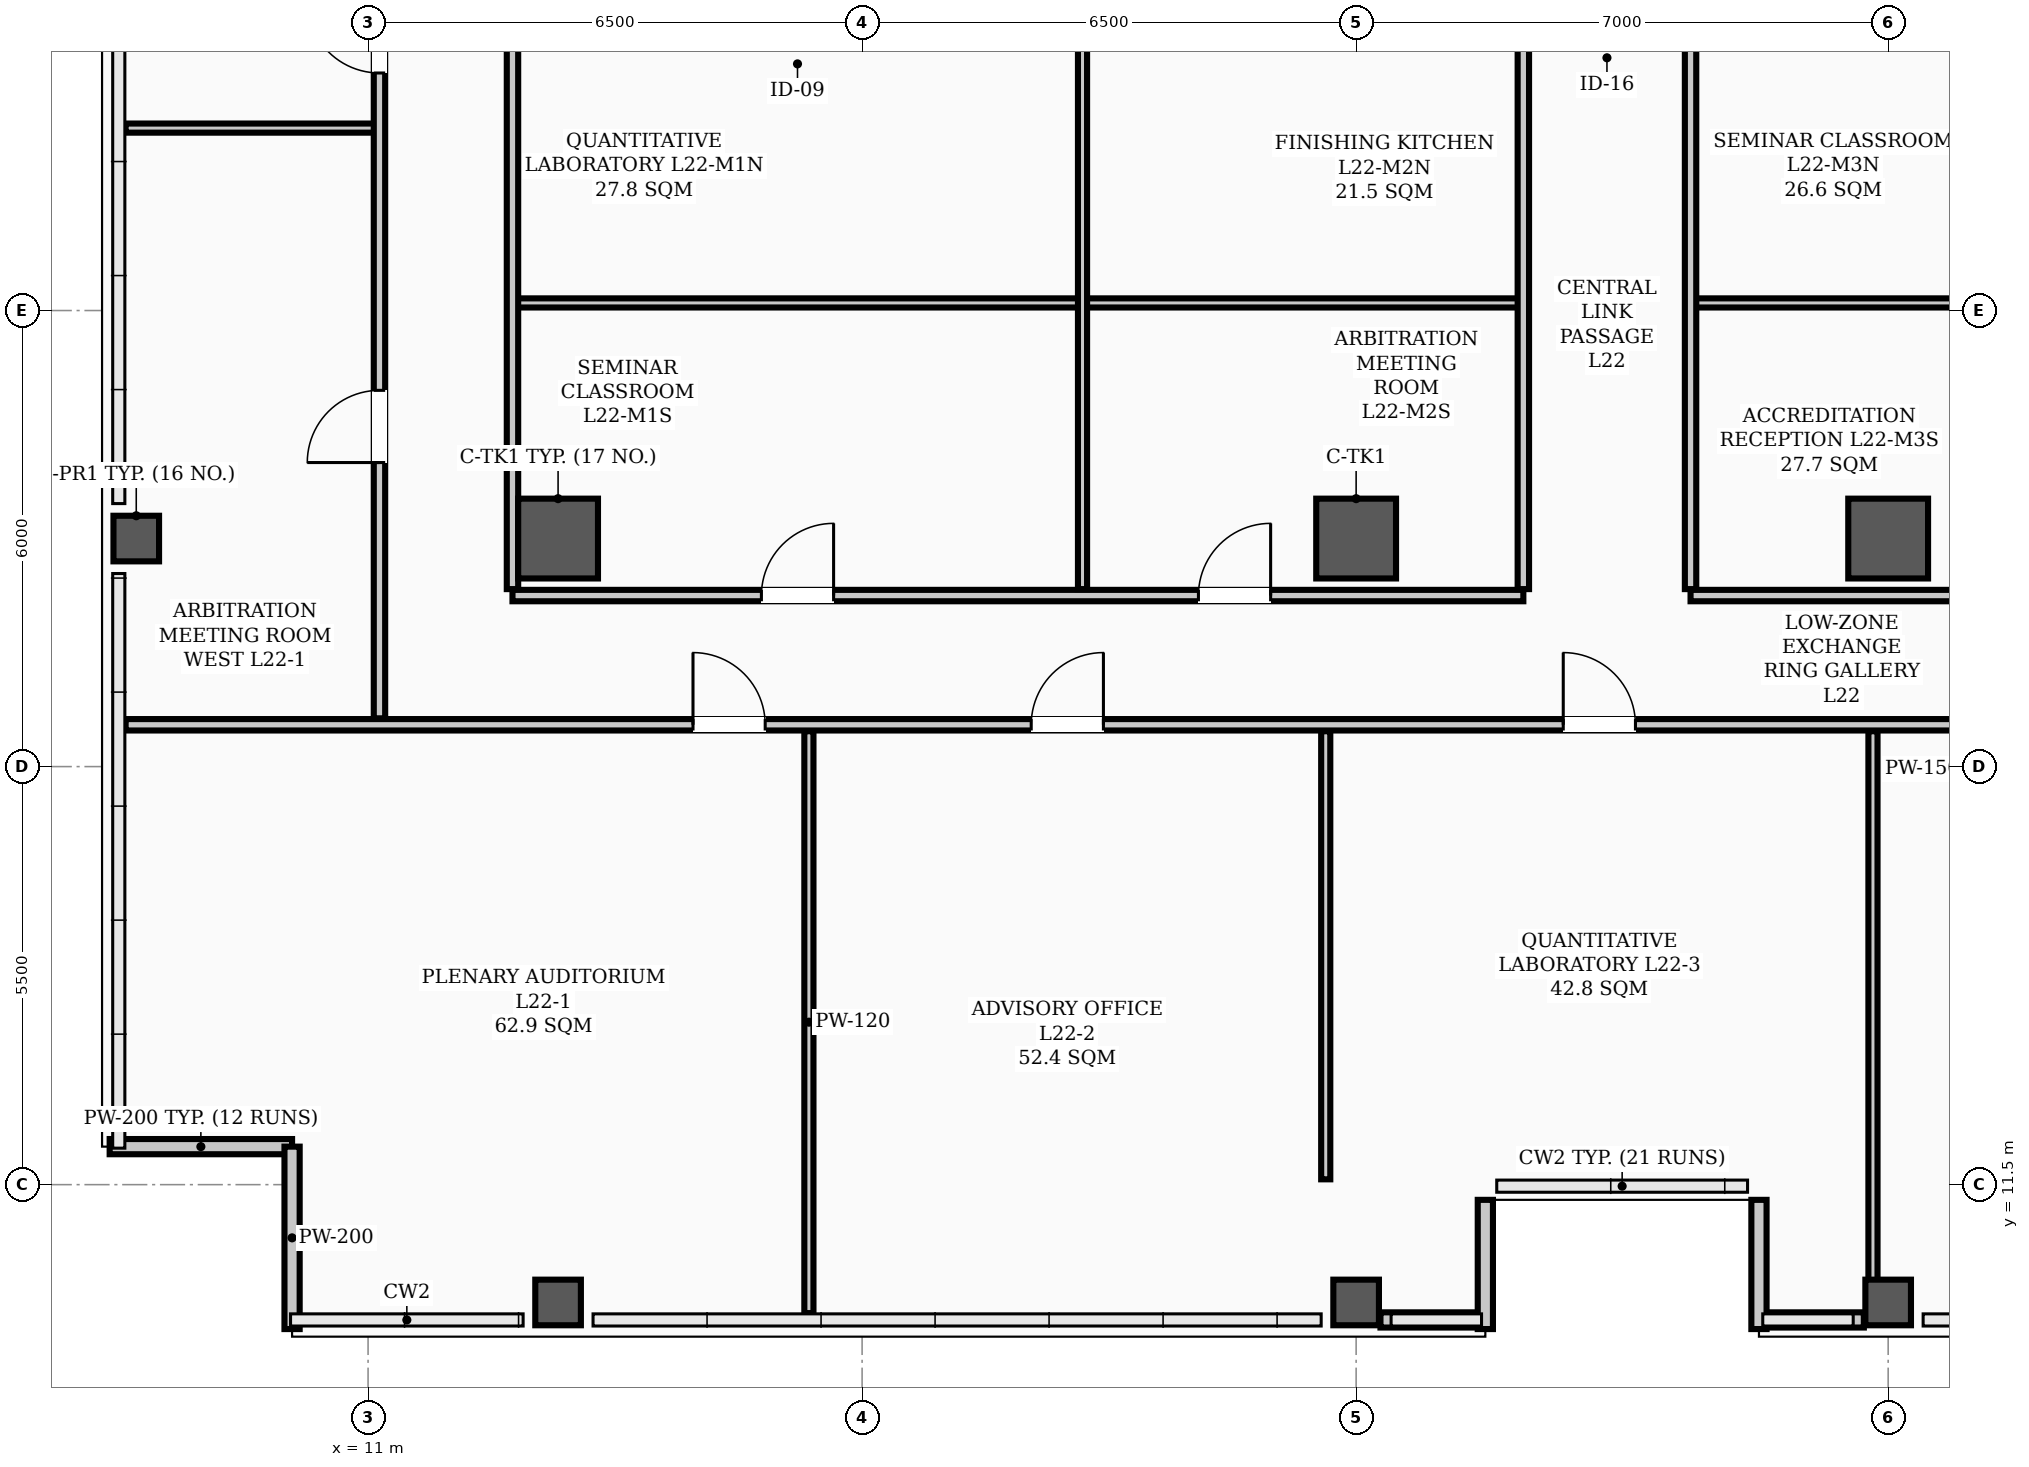
"""IFC4 building model, lengths in metres.
Left out: names, types, materials, properties, quantities, classifications, styles, units other than length and angle.
Written with IfcOpenShell. Run it as: python <this file> out.ifc"""

import sys

from ifc_helpers import new_model, si_unit, direction, frame, frame_2d, origin, origin_2d, place, context, subcontext, project, spatial, rectangle, hollow_rectangle, extrude, element, fill, save


model = new_model("IFC4")
c1 = context("Model", 3, precision=1e-05, world=origin(), true_north=direction((0.0, 1.0)))
c2 = subcontext(c1, "Body", "Model", "MODEL_VIEW")
j1 = project(units=[si_unit("LENGTHUNIT", "METRE"), si_unit("PLANEANGLEUNIT", "RADIAN")], contexts=[c1])
p1 = place(None, origin())
s1 = spatial("IfcSite", under=j1, at=p1, CompositionType="ELEMENT")
p2 = place(p1, origin())
s2 = spatial("IfcBuilding", under=s1, at=p2, CompositionType="ELEMENT")
p3 = place(p2, frame((0.0, 0.0, 88.9)))
s3 = spatial("IfcBuildingStorey", under=s2, at=p3, CompositionType="ELEMENT", Elevation=88.9)
for number, where, z_axis, x_axis in (
    (1, (13.5, 20.0, 0.0), (0.0, 0.0, 1.0), (1.0, 0.0, 0.0)),
    (2, (24.0, 20.0, 0.0), (0.0, 0.0, 1.0), (1.0, 0.0, 0.0)),
    (3, (31.0, 20.0, 0.0), (0.0, 0.0, 1.0), (1.0, 0.0, 0.0)),
):
    element("IfcColumn", number, at=place(p3, frame(where, z_axis=z_axis, x_axis=x_axis)), inside=s3, PredefinedType="COLUMN", context=c2, shape_type="SweptSolid", body=[
        extrude(hollow_rectangle(XDim=1.05, YDim=1.05, WallThickness=0.038, InnerFilletRadius=0.019, OuterFilletRadius=0.057, at=origin_2d()), origin(), (0.0, 0.0, 1.0), 3.9),
    ])
for number, where, z_axis, x_axis in (
    (4, (7.95, 20.0, 0.0), (0.0, 0.0, 1.0), (1.0, 0.0, 0.0)),
    (5, (13.5, 9.95, 0.0), (0.0, 0.0, 1.0), (1.0, 0.0, 0.0)),
    (6, (24.0, 9.95, 0.0), (0.0, 0.0, 1.0), (1.0, 0.0, 0.0)),
    (7, (31.0, 9.95, 0.0), (0.0, 0.0, 1.0), (1.0, 0.0, 0.0)),
):
    element("IfcColumn", number, at=place(p3, frame(where, z_axis=z_axis, x_axis=x_axis)), inside=s3, PredefinedType="COLUMN", context=c2, shape_type="SweptSolid", body=[
        extrude(hollow_rectangle(XDim=0.6, YDim=0.6, WallThickness=0.026, InnerFilletRadius=0.013, OuterFilletRadius=0.039, at=origin_2d()), origin(), (0.0, 0.0, 1.0), 3.9),
    ])
for number, where, z_axis, x_axis in (
    (8, (24.32, 9.72, 0.0), (0.0, 0.0, 1.0), (1.0, 0.0, 0.0)),
    (9, (29.35, 9.72, 0.0), (0.0, 0.0, 1.0), (1.0, 0.0, 0.0)),
):
    element("IfcWall", number, at=place(p3, frame(where, z_axis=z_axis, x_axis=x_axis)), inside=s3, PredefinedType="PARAPET", context=c2, shape_type="SweptSolid", body=[
        extrude(rectangle(XDim=1.33, YDim=0.2, at=frame_2d((0.665, 0.0))), origin(), (0.0, 0.0, 1.0), 1.2),
    ])
for number, where, z_axis, x_axis in (
    (10, (7.6, 12.0, 0.0), (0.0, 0.0, 1.0), (1.0, 0.0, 0.0)),
    (11, (10.0, 12.0, 0.0), (0.0, 0.0, 1.0), (0.0, -1.0, 0.0)),
):
    element("IfcWall", number, at=place(p3, frame(where, z_axis=z_axis, x_axis=x_axis)), inside=s3, PredefinedType="PARAPET", context=c2, shape_type="SweptSolid", body=[
        extrude(rectangle(XDim=2.4, YDim=0.2, at=frame_2d((1.2, 0.0))), origin(), (0.0, 0.0, 1.0), 1.2),
    ])
for number, where, z_axis, x_axis in (
    (12, (25.7, 9.6, 0.0), (0.0, 0.0, 1.0), (0.0, 1.0, 0.0)),
    (13, (29.3, 11.3, 0.0), (0.0, 0.0, 1.0), (0.0, -1.0, 0.0)),
):
    element("IfcWall", number, at=place(p3, frame(where, z_axis=z_axis, x_axis=x_axis)), inside=s3, PredefinedType="PARAPET", context=c2, shape_type="SweptSolid", body=[
        extrude(rectangle(XDim=1.7, YDim=0.2, at=frame_2d((0.85, 0.0))), origin(), (0.0, 0.0, 1.0), 1.2),
    ])
p4 = place(p3, frame((7.81, 17.55, 0.0), z_axis=(0.0, 0.0, 1.0), x_axis=(1.0, 0.0, 0.0)))
e14 = element("IfcWall", 14, at=p4, inside=s3, PredefinedType="PARTITIONING", context=c2, shape_type="SweptSolid", body=[
    extrude(rectangle(XDim=49.38, YDim=0.15, at=frame_2d((24.69, 0.0))), origin(), (0.0, 0.0, 1.0), 3.1),
])
p5 = place(p4, frame((7.465, 0.0, 0.0)))
e15 = element("IfcOpeningElement", 15, at=p5, cuts=e14, PredefinedType="OPENING", context=c2, shape_type="SweptSolid", body=[
    extrude(rectangle(XDim=0.95, YDim=2.08, at=frame_2d((0.475, 1.04))), frame((0.0, 0.085, 0.0), z_axis=(0.0, -1.0, 0.0), x_axis=(1.0, 0.0, 0.0)), (0.0, 0.0, 1.0), 0.17),
])
p6 = place(p4, frame((11.915, 0.0, 0.0)))
e16 = element("IfcOpeningElement", 16, at=p6, cuts=e14, PredefinedType="OPENING", context=c2, shape_type="SweptSolid", body=[
    extrude(rectangle(XDim=0.95, YDim=2.08, at=frame_2d((0.475, 1.04))), frame((0.0, 0.085, 0.0), z_axis=(0.0, -1.0, 0.0), x_axis=(1.0, 0.0, 0.0)), (0.0, 0.0, 1.0), 0.17),
])
p7 = place(p4, frame((18.915, 0.0, 0.0)))
e17 = element("IfcOpeningElement", 17, at=p7, cuts=e14, PredefinedType="OPENING", context=c2, shape_type="SweptSolid", body=[
    extrude(rectangle(XDim=0.95, YDim=2.08, at=frame_2d((0.475, 1.04))), frame((0.0, 0.085, 0.0), z_axis=(0.0, -1.0, 0.0), x_axis=(1.0, 0.0, 0.0)), (0.0, 0.0, 1.0), 0.17),
])
p8 = place(p4, frame((26.015, 0.0, 0.0)))
e18 = element("IfcOpeningElement", 18, at=p8, cuts=e14, PredefinedType="OPENING", context=c2, shape_type="SweptSolid", body=[
    extrude(rectangle(XDim=0.95, YDim=2.08, at=frame_2d((0.475, 1.04))), frame((0.0, 0.085, 0.0), z_axis=(0.0, -1.0, 0.0), x_axis=(1.0, 0.0, 0.0)), (0.0, 0.0, 1.0), 0.17),
])
p9 = place(p4, frame((32.815, 0.0, 0.0)))
e19 = element("IfcOpeningElement", 19, at=p9, cuts=e14, PredefinedType="OPENING", context=c2, shape_type="SweptSolid", body=[
    extrude(rectangle(XDim=0.95, YDim=2.08, at=frame_2d((0.475, 1.04))), frame((0.0, 0.085, 0.0), z_axis=(0.0, -1.0, 0.0), x_axis=(1.0, 0.0, 0.0)), (0.0, 0.0, 1.0), 0.17),
])
p10 = place(p4, frame((37.09, 0.0, 0.0)))
e20 = element("IfcOpeningElement", 20, at=p10, cuts=e14, PredefinedType="OPENING", context=c2, shape_type="SweptSolid", body=[
    extrude(rectangle(XDim=0.95, YDim=2.08, at=frame_2d((0.475, 1.04))), frame((0.0, 0.085, 0.0), z_axis=(0.0, -1.0, 0.0), x_axis=(1.0, 0.0, 0.0)), (0.0, 0.0, 1.0), 0.17),
])
p11 = place(p3, frame((12.9, 19.25, 0.0), z_axis=(0.0, 0.0, 1.0), x_axis=(1.0, 0.0, 0.0)))
e21 = element("IfcWall", 21, at=p11, inside=s3, PredefinedType="PARTITIONING", context=c2, shape_type="SweptSolid", body=[
    extrude(rectangle(XDim=13.3, YDim=0.15, at=frame_2d((6.65, 0.0))), origin(), (0.0, 0.0, 1.0), 3.1),
])
p12 = place(p11, frame((3.275, 0.0, 0.0)))
e22 = element("IfcOpeningElement", 22, at=p12, cuts=e21, PredefinedType="OPENING", context=c2, shape_type="SweptSolid", body=[
    extrude(rectangle(XDim=0.95, YDim=2.08, at=frame_2d((0.475, 1.04))), frame((0.0, 0.085, 0.0), z_axis=(0.0, -1.0, 0.0), x_axis=(1.0, 0.0, 0.0)), (0.0, 0.0, 1.0), 0.17),
])
p13 = place(p11, frame((9.025, 0.0, 0.0)))
e23 = element("IfcOpeningElement", 23, at=p13, cuts=e21, PredefinedType="OPENING", context=c2, shape_type="SweptSolid", body=[
    extrude(rectangle(XDim=0.95, YDim=2.08, at=frame_2d((0.475, 1.04))), frame((0.0, 0.085, 0.0), z_axis=(0.0, -1.0, 0.0), x_axis=(1.0, 0.0, 0.0)), (0.0, 0.0, 1.0), 0.17),
])
p14 = place(p3, frame((28.4, 19.25, 0.0), z_axis=(0.0, 0.0, 1.0), x_axis=(1.0, 0.0, 0.0)))
e24 = element("IfcWall", 24, at=p14, inside=s3, PredefinedType="PARTITIONING", context=c2, shape_type="SweptSolid", body=[
    extrude(rectangle(XDim=16.2, YDim=0.15, at=frame_2d((8.1, 0.0))), origin(), (0.0, 0.0, 1.0), 3.1),
])
p15 = place(p14, frame((4.025, 0.0, 0.0)))
e25 = element("IfcOpeningElement", 25, at=p15, cuts=e24, PredefinedType="OPENING", context=c2, shape_type="SweptSolid", body=[
    extrude(rectangle(XDim=0.95, YDim=2.08, at=frame_2d((0.475, 1.04))), frame((0.0, 0.085, 0.0), z_axis=(0.0, -1.0, 0.0), x_axis=(1.0, 0.0, 0.0)), (0.0, 0.0, 1.0), 0.17),
])
p16 = place(p14, frame((11.225, 0.0, 0.0)))
e26 = element("IfcOpeningElement", 26, at=p16, cuts=e24, PredefinedType="OPENING", context=c2, shape_type="SweptSolid", body=[
    extrude(rectangle(XDim=0.95, YDim=2.08, at=frame_2d((0.475, 1.04))), frame((0.0, 0.085, 0.0), z_axis=(0.0, -1.0, 0.0), x_axis=(1.0, 0.0, 0.0)), (0.0, 0.0, 1.0), 0.17),
])
p17 = place(p3, frame((12.9, 23.1, 0.0), z_axis=(0.0, 0.0, 1.0), x_axis=(1.0, 0.0, 0.0)))
e27 = element("IfcWall", 27, at=p17, inside=s3, PredefinedType="PARTITIONING", context=c2, shape_type="SweptSolid", body=[
    extrude(rectangle(XDim=7.5, YDim=0.12, at=frame_2d((3.75, 0.0))), origin(), (0.0, 0.0, 1.0), 3.1),
])
p18 = place(p3, frame((20.4, 23.1, 0.0), z_axis=(0.0, 0.0, 1.0), x_axis=(1.0, 0.0, 0.0)))
e28 = element("IfcWall", 28, at=p18, inside=s3, PredefinedType="PARTITIONING", context=c2, shape_type="SweptSolid", body=[
    extrude(rectangle(XDim=5.8, YDim=0.12, at=frame_2d((2.9, 0.0))), origin(), (0.0, 0.0, 1.0), 3.1),
])
p19 = place(p3, frame((28.4, 23.1, 0.0), z_axis=(0.0, 0.0, 1.0), x_axis=(1.0, 0.0, 0.0)))
e29 = element("IfcWall", 29, at=p19, inside=s3, PredefinedType="PARTITIONING", context=c2, shape_type="SweptSolid", body=[
    extrude(rectangle(XDim=7.2, YDim=0.12, at=frame_2d((3.6, 0.0))), origin(), (0.0, 0.0, 1.0), 3.1),
])
p20 = place(p3, frame((7.81, 25.4, 0.0), z_axis=(0.0, 0.0, 1.0), x_axis=(1.0, 0.0, 0.0)))
e30 = element("IfcWall", 30, at=p20, inside=s3, PredefinedType="PARTITIONING", context=c2, shape_type="SweptSolid", body=[
    extrude(rectangle(XDim=3.34, YDim=0.12, at=frame_2d((1.67, 0.0))), origin(), (0.0, 0.0, 1.0), 3.212),
])
for number, where, z_axis, x_axis in (
    (31, (26.2, 19.335, 0.0), (0.0, 0.0, 1.0), (0.0, 1.0, 0.0)),
    (32, (28.4, 19.335, 0.0), (0.0, 0.0, 1.0), (0.0, 1.0, 0.0)),
):
    element("IfcWall", number, at=place(p3, frame(where, z_axis=z_axis, x_axis=x_axis)), inside=s3, PredefinedType="PARTITIONING", context=c2, shape_type="SweptSolid", body=[
        extrude(rectangle(XDim=7.38, YDim=0.15, at=frame_2d((3.69, 0.0))), origin(), (0.0, 0.0, 1.0), 3.0),
    ])
p21 = place(p3, frame((11.15, 17.635, 0.0), z_axis=(0.0, 0.0, 1.0), x_axis=(0.0, 1.0, 0.0)))
e33 = element("IfcWall", 33, at=p21, inside=s3, PredefinedType="PARTITIONING", context=c2, shape_type="SweptSolid", body=[
    extrude(rectangle(XDim=20.58, YDim=0.15, at=frame_2d((10.29, 0.0))), origin(), (0.0, 0.0, 1.0), 3.0),
])
p22 = place(p21, frame((3.365, 0.0, 0.0)))
e34 = element("IfcOpeningElement", 34, at=p22, cuts=e33, PredefinedType="OPENING", context=c2, shape_type="SweptSolid", body=[
    extrude(rectangle(XDim=0.95, YDim=2.08, at=frame_2d((0.475, 1.04))), frame((0.0, 0.085, 0.0), z_axis=(0.0, -1.0, 0.0), x_axis=(1.0, 0.0, 0.0)), (0.0, 0.0, 1.0), 0.17),
])
p23 = place(p21, frame((8.49, 0.0, 0.0)))
e35 = element("IfcOpeningElement", 35, at=p23, cuts=e33, PredefinedType="OPENING", context=c2, shape_type="SweptSolid", body=[
    extrude(rectangle(XDim=0.95, YDim=2.08, at=frame_2d((0.475, 1.04))), frame((0.0, 0.085, 0.0), z_axis=(0.0, -1.0, 0.0), x_axis=(1.0, 0.0, 0.0)), (0.0, 0.0, 1.0), 0.17),
])
p24 = place(p21, frame((16.44, 0.0, 0.0)))
e36 = element("IfcOpeningElement", 36, at=p24, cuts=e33, PredefinedType="OPENING", context=c2, shape_type="SweptSolid", body=[
    extrude(rectangle(XDim=0.95, YDim=2.08, at=frame_2d((0.475, 1.04))), frame((0.0, 0.085, 0.0), z_axis=(0.0, -1.0, 0.0), x_axis=(1.0, 0.0, 0.0)), (0.0, 0.0, 1.0), 0.17),
])
p25 = place(p3, frame((12.9, 19.335, 0.0), z_axis=(0.0, 0.0, 1.0), x_axis=(0.0, 1.0, 0.0)))
e37 = element("IfcWall", 37, at=p25, inside=s3, PredefinedType="PARTITIONING", context=c2, shape_type="SweptSolid", body=[
    extrude(rectangle(XDim=7.38, YDim=0.15, at=frame_2d((3.69, 0.0))), origin(), (0.0, 0.0, 1.0), 3.0),
])
p26 = place(p3, frame((16.8, 9.81, 0.0), z_axis=(0.0, 0.0, 1.0), x_axis=(0.0, 1.0, 0.0)))
e38 = element("IfcWall", 38, at=p26, inside=s3, PredefinedType="PARTITIONING", context=c2, shape_type="SweptSolid", body=[
    extrude(rectangle(XDim=7.655, YDim=0.12, at=frame_2d((3.828, 0.0))), origin(), (0.0, 0.0, 1.0), 3.212),
])
p27 = place(p3, frame((23.6, 11.57, 0.0), z_axis=(0.0, 0.0, 1.0), x_axis=(0.0, 1.0, 0.0)))
e39 = element("IfcWall", 39, at=p27, inside=s3, PredefinedType="PARTITIONING", context=c2, shape_type="SweptSolid", body=[
    extrude(rectangle(XDim=5.895, YDim=0.12, at=frame_2d((2.948, 0.0))), origin(), (0.0, 0.0, 1.0), 3.1),
])
p28 = place(p3, frame((30.8, 9.81, 0.0), z_axis=(0.0, 0.0, 1.0), x_axis=(0.0, 1.0, 0.0)))
e40 = element("IfcWall", 40, at=p28, inside=s3, PredefinedType="PARTITIONING", context=c2, shape_type="SweptSolid", body=[
    extrude(rectangle(XDim=7.655, YDim=0.12, at=frame_2d((3.828, 0.0))), origin(), (0.0, 0.0, 1.0), 3.1),
])
p29 = place(p3, frame((20.4, 19.335, 0.0), z_axis=(0.0, 0.0, 1.0), x_axis=(0.0, 1.0, 0.0)))
e41 = element("IfcWall", 41, at=p29, inside=s3, PredefinedType="PARTITIONING", context=c2, shape_type="SweptSolid", body=[
    extrude(rectangle(XDim=7.38, YDim=0.12, at=frame_2d((3.69, 0.0))), origin(), (0.0, 0.0, 1.0), 3.0),
])
p30 = place(p5, origin())
e42 = element("IfcDoor", 42, at=p30, inside=s3, OperationType="SINGLE_SWING_LEFT", PredefinedType="DOOR", context=c2, shape_type="SweptSolid", body=[
    extrude(rectangle(XDim=0.95, YDim=2.08, at=frame_2d((0.475, 1.04))), frame((0.0, 0.025, 0.0), z_axis=(0.0, -1.0, 0.0), x_axis=(1.0, 0.0, 0.0)), (0.0, 0.0, 1.0), 0.05),
])
fill(e15, e42)
p31 = place(p6, origin())
e43 = element("IfcDoor", 43, at=p31, inside=s3, OperationType="SINGLE_SWING_RIGHT", PredefinedType="DOOR", context=c2, shape_type="SweptSolid", body=[
    extrude(rectangle(XDim=0.95, YDim=2.08, at=frame_2d((0.475, 1.04))), frame((0.0, 0.025, 0.0), z_axis=(0.0, -1.0, 0.0), x_axis=(1.0, 0.0, 0.0)), (0.0, 0.0, 1.0), 0.05),
])
fill(e16, e43)
p32 = place(p7, origin())
e44 = element("IfcDoor", 44, at=p32, inside=s3, OperationType="SINGLE_SWING_LEFT", PredefinedType="DOOR", context=c2, shape_type="SweptSolid", body=[
    extrude(rectangle(XDim=0.95, YDim=2.08, at=frame_2d((0.475, 1.04))), frame((0.0, 0.025, 0.0), z_axis=(0.0, -1.0, 0.0), x_axis=(1.0, 0.0, 0.0)), (0.0, 0.0, 1.0), 0.05),
])
fill(e17, e44)
p33 = place(p12, origin())
e45 = element("IfcDoor", 45, at=p33, inside=s3, OperationType="SINGLE_SWING_RIGHT", PredefinedType="DOOR", context=c2, shape_type="SweptSolid", body=[
    extrude(rectangle(XDim=0.95, YDim=2.08, at=frame_2d((0.475, 1.04))), frame((0.0, 0.025, 0.0), z_axis=(0.0, -1.0, 0.0), x_axis=(1.0, 0.0, 0.0)), (0.0, 0.0, 1.0), 0.05),
])
fill(e22, e45)
p34 = place(p13, origin())
e46 = element("IfcDoor", 46, at=p34, inside=s3, OperationType="SINGLE_SWING_RIGHT", PredefinedType="DOOR", context=c2, shape_type="SweptSolid", body=[
    extrude(rectangle(XDim=0.95, YDim=2.08, at=frame_2d((0.475, 1.04))), frame((0.0, 0.025, 0.0), z_axis=(0.0, -1.0, 0.0), x_axis=(1.0, 0.0, 0.0)), (0.0, 0.0, 1.0), 0.05),
])
fill(e23, e46)
p35 = place(p22, origin())
e47 = element("IfcDoor", 47, at=p35, inside=s3, OperationType="SINGLE_SWING_LEFT", PredefinedType="DOOR", context=c2, shape_type="SweptSolid", body=[
    extrude(rectangle(XDim=0.95, YDim=2.08, at=frame_2d((0.475, 1.04))), frame((0.0, 0.025, 0.0), z_axis=(0.0, -1.0, 0.0), x_axis=(1.0, 0.0, 0.0)), (0.0, 0.0, 1.0), 0.05),
])
fill(e34, e47)
p36 = place(p23, origin())
e48 = element("IfcDoor", 48, at=p36, inside=s3, OperationType="SINGLE_SWING_RIGHT", PredefinedType="DOOR", context=c2, shape_type="SweptSolid", body=[
    extrude(rectangle(XDim=0.95, YDim=2.08, at=frame_2d((0.475, 1.04))), frame((0.0, 0.025, 0.0), z_axis=(0.0, -1.0, 0.0), x_axis=(1.0, 0.0, 0.0)), (0.0, 0.0, 1.0), 0.05),
])
fill(e35, e48)
save(model, sys.argv[1])
